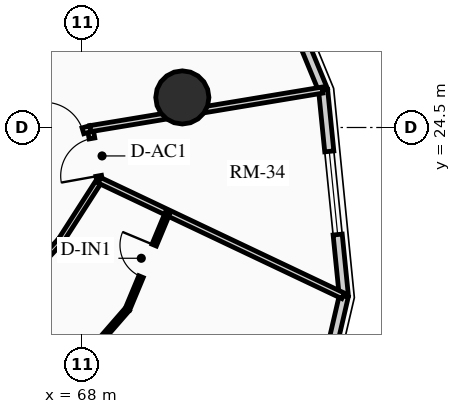
"""IFC4 building model, lengths in metres.
Left out: names, types, materials, properties, quantities, classifications, styles, units other than length and angle.
Written with IfcOpenShell. Run it as: python <this file> out.ifc"""

import sys

from ifc_helpers import new_model, si_unit, direction, frame, frame_2d, origin, origin_2d, place, context, subcontext, project, spatial, rectangle, circle, extrude, source, transform, mapped, element, fill, save


model = new_model("IFC4")
c1 = context("Model", 3, precision=1e-05, world=origin(), true_north=direction((0.0, 1.0)))
c2 = subcontext(c1, "Body", "Model", "MODEL_VIEW")
j1 = project(units=[si_unit("LENGTHUNIT", "METRE"), si_unit("PLANEANGLEUNIT", "RADIAN")], contexts=[c1])
p1 = place(None, origin())
s1 = spatial("IfcSite", under=j1, at=p1, CompositionType="ELEMENT")
p2 = place(p1, origin())
s2 = spatial("IfcBuilding", under=s1, at=p2, CompositionType="ELEMENT")
p3 = place(p2, frame((0.0, 0.0, 107.98)))
s3 = spatial("IfcBuildingStorey", under=s2, at=p3, CompositionType="ELEMENT", Elevation=107.98)
p4 = place(p3, frame((70.635, 25.291, 0.0), z_axis=(0.0, 0.0, 1.0), x_axis=(1.0, 0.0, 0.0)))
e1 = element("IfcColumn", 1, at=p4, inside=s3, PredefinedType="USERDEFINED", context=c2, shape_type="SweptSolid", body=[
    extrude(circle(Radius=0.7, at=origin_2d()), origin(), (0.0, 0.0, 1.0), 2.91),
])
p5 = place(p3, frame((74.885, 20.067, 0.0), z_axis=(0.0, 0.0, 1.0), x_axis=(-0.225834725257, -0.974165631126, 0.0)))
e2 = element("IfcWall", 2, at=p5, inside=s3, PredefinedType="SOLIDWALL", context=c2, shape_type="SweptSolid", body=[
    extrude(rectangle(XDim=5.119, YDim=0.24, at=frame_2d((2.56, 0.0))), origin(), (0.0, 0.0, 1.0), 2.179),
])
p6 = place(p3, frame((74.339, 25.487, 0.0), z_axis=(0.0, 0.0, 1.0), x_axis=(0.10015591906, -0.994971754311, 0.0)))
e3 = element("IfcWall", 3, at=p6, inside=s3, PredefinedType="SOLIDWALL", context=c2, shape_type="SweptSolid", body=[
    extrude(rectangle(XDim=5.448, YDim=0.24, at=frame_2d((2.724, 0.0))), origin(), (0.0, 0.0, 1.0), 2.179),
])
m1 = source(origin(), c2, "Body", "SweptSolid", [
    extrude(rectangle(XDim=2.2, YDim=1.35, at=frame_2d((1.1, 0.675))), frame((0.0, 0.13, 0.0), z_axis=(0.0, -1.0, 0.0), x_axis=(1.0, 0.0, 0.0)), (0.0, 0.0, 1.0), 0.26),
])
p7 = place(p6, frame((1.624, 0.0, 0.65)))
e4 = element("IfcOpeningElement", 4, at=p7, cuts=e3, PredefinedType="OPENING", context=c2, shape_type="MappedRepresentation", body=[
    mapped(m1, transform((0.0, 0.0, 0.0), x_axis=(1.0, 0.0, 0.0), y_axis=(0.0, 1.0, 0.0), z_axis=(0.0, 0.0, 1.0), scale=1.0)),
])
p8 = place(p3, frame((72.145, 30.811, 0.0), z_axis=(0.0, 0.0, 1.0), x_axis=(0.381027003055, -0.924563909604, 0.0)))
e5 = element("IfcWall", 5, at=p8, inside=s3, PredefinedType="SOLIDWALL", context=c2, shape_type="SweptSolid", body=[
    extrude(rectangle(XDim=5.758, YDim=0.24, at=frame_2d((2.879, 0.0))), origin(), (0.0, 0.0, 1.0), 2.179),
])
p9 = place(p3, frame((62.903, 16.667, 0.0), z_axis=(0.0, 0.0, 1.0), x_axis=(0.682371947497, 0.731005147225, 0.0)))
e6 = element("IfcWall", 6, at=p9, inside=s3, PredefinedType="PARTITIONING", context=c2, shape_type="SweptSolid", body=[
    extrude(rectangle(XDim=6.642, YDim=0.15, at=frame_2d((3.321, 0.0))), origin(), (0.0, 0.0, 1.0), 2.225),
])
m2 = source(origin(), c2, "Body", "SweptSolid", [
    extrude(rectangle(XDim=1.05, YDim=2.015, at=frame_2d((0.525, 1.007))), frame((0.0, 0.085, 0.0), z_axis=(0.0, -1.0, 0.0), x_axis=(1.0, 0.0, 0.0)), (0.0, 0.0, 1.0), 0.17),
])
p10 = place(p9, frame((2.796, 0.0, 0.0)))
e7 = element("IfcOpeningElement", 7, at=p10, cuts=e6, PredefinedType="OPENING", context=c2, shape_type="MappedRepresentation", body=[
    mapped(m2, transform((0.0, 0.0, 0.0), x_axis=(1.0, 0.0, 0.0), y_axis=(0.0, 1.0, 0.0), z_axis=(0.0, 0.0, 1.0), scale=1.0)),
])
p11 = place(p3, frame((67.435, 21.521, 0.0), z_axis=(0.0, 0.0, 1.0), x_axis=(0.540777197838, 0.841165870859, 0.0)))
e8 = element("IfcWall", 8, at=p11, inside=s3, PredefinedType="PARTITIONING", context=c2, shape_type="SweptSolid", body=[
    extrude(rectangle(XDim=1.888, YDim=0.15, at=frame_2d((0.944, 0.0))), origin(), (0.0, 0.0, 1.0), 2.225),
])
p12 = place(p3, frame((68.456, 23.11, 0.0), z_axis=(0.0, 0.0, 1.0), x_axis=(-0.1772522795, 0.984165448191, 0.0)))
e9 = element("IfcWall", 9, at=p12, inside=s3, PredefinedType="PARTITIONING", context=c2, shape_type="SweptSolid", body=[
    extrude(rectangle(XDim=1.382, YDim=0.15, at=frame_2d((0.691, 0.0))), origin(), (0.0, 0.0, 1.0), 2.225),
])
m3 = source(origin(), c2, "Body", "SweptSolid", [
    extrude(rectangle(XDim=1.0, YDim=2.015, at=frame_2d((0.5, 1.007))), frame((0.0, 0.085, 0.0), z_axis=(0.0, -1.0, 0.0), x_axis=(1.0, 0.0, 0.0)), (0.0, 0.0, 1.0), 0.17),
])
p13 = place(p12, frame((0.12, 0.0, 0.0)))
e10 = element("IfcOpeningElement", 10, at=p13, cuts=e9, PredefinedType="OPENING", context=c2, shape_type="MappedRepresentation", body=[
    mapped(m3, transform((0.0, 0.0, 0.0), x_axis=(1.0, 0.0, 0.0), y_axis=(0.0, 1.0, 0.0), z_axis=(0.0, 0.0, 1.0), scale=1.0)),
])
p14 = place(p3, frame((68.456, 23.11, 0.0), z_axis=(0.0, 0.0, 1.0), x_axis=(0.903539425667, -0.428504966442, 0.0)))
e11 = element("IfcWall", 11, at=p14, inside=s3, PredefinedType="PARTITIONING", context=c2, shape_type="SweptSolid", body=[
    extrude(rectangle(XDim=7.094, YDim=0.16, at=frame_2d((3.547, 0.0))), origin(), (0.0, 0.0, 1.0), 2.179),
])
p15 = place(p3, frame((68.211, 24.469, 0.0), z_axis=(0.0, 0.0, 1.0), x_axis=(0.986479033329, 0.163887512651, 0.0)))
e12 = element("IfcWall", 12, at=p15, inside=s3, PredefinedType="PARTITIONING", context=c2, shape_type="SweptSolid", body=[
    extrude(rectangle(XDim=6.193, YDim=0.16, at=frame_2d((3.096, 0.0))), origin(), (0.0, 0.0, 1.0), 2.179),
])
p16 = place(p3, frame((66.056, 23.828, 0.0), z_axis=(0.0, 0.0, 1.0), x_axis=(0.958475403544, 0.285175210708, 0.0)))
e13 = element("IfcWall", 13, at=p16, inside=s3, PredefinedType="PARTITIONING", context=c2, shape_type="SweptSolid", body=[
    extrude(rectangle(XDim=2.248, YDim=0.16, at=frame_2d((1.124, 0.0))), origin(), (0.0, 0.0, 1.0), 2.225),
])
m4 = source(origin(), c2, "Body", "SweptSolid", [
    extrude(rectangle(XDim=1.05, YDim=2.015, at=frame_2d((0.525, 1.007))), frame((0.0, 0.09, 0.0), z_axis=(0.0, -1.0, 0.0), x_axis=(1.0, 0.0, 0.0)), (0.0, 0.0, 1.0), 0.18),
])
p17 = place(p16, frame((0.998, 0.0, 0.0)))
e14 = element("IfcOpeningElement", 14, at=p17, cuts=e13, PredefinedType="OPENING", context=c2, shape_type="MappedRepresentation", body=[
    mapped(m4, transform((0.0, 0.0, 0.0), x_axis=(1.0, 0.0, 0.0), y_axis=(0.0, 1.0, 0.0), z_axis=(0.0, 0.0, 1.0), scale=1.0)),
])
p18 = place(p3, frame((65.162, 15.088, 0.0), z_axis=(0.0, 0.0, 1.0), x_axis=(0.656379509785, 0.754430871011, 0.0)))
e15 = element("IfcWall", 15, at=p18, inside=s3, PredefinedType="PARTITIONING", context=c2, shape_type="SweptSolid", body=[
    extrude(rectangle(XDim=6.14, YDim=0.125, at=frame_2d((3.07, 0.0))), origin(), (0.0, 0.0, 1.0), 2.225),
])
p19 = place(p3, frame((69.192, 19.72, 0.0), z_axis=(0.0, 0.0, 1.0), x_axis=(0.384899070029, 0.922958669655, 0.0)))
e16 = element("IfcWall", 16, at=p19, inside=s3, PredefinedType="PARTITIONING", context=c2, shape_type="SweptSolid", body=[
    extrude(rectangle(XDim=2.75, YDim=0.125, at=frame_2d((1.375, 0.0))), origin(), (0.0, 0.0, 1.0), 2.179),
])
m5 = source(origin(), c2, "Body", "SweptSolid", [
    extrude(rectangle(XDim=0.9, YDim=2.005, at=frame_2d((0.45, 1.002))), frame((0.0, 0.073, 0.0), z_axis=(0.0, -1.0, 0.0), x_axis=(1.0, 0.0, 0.0)), (0.0, 0.0, 1.0), 0.145),
])
p20 = place(p19, frame((0.925, 0.0, 0.0)))
e17 = element("IfcOpeningElement", 17, at=p20, cuts=e16, PredefinedType="OPENING", context=c2, shape_type="MappedRepresentation", body=[
    mapped(m5, transform((0.0, 0.0, 0.0), x_axis=(1.0, 0.0, 0.0), y_axis=(0.0, 1.0, 0.0), z_axis=(0.0, 0.0, 1.0), scale=1.0)),
])
m6 = source(origin(), c2, "Body", "SweptSolid", [
    extrude(rectangle(XDim=2.2, YDim=1.35, at=frame_2d((1.1, 0.675))), frame((0.0, 0.03, 0.0), z_axis=(0.0, -1.0, 0.0), x_axis=(1.0, 0.0, 0.0)), (0.0, 0.0, 1.0), 0.06),
])
p21 = place(p7, origin())
e18 = element("IfcWindow", 18, at=p21, inside=s3, PartitioningType="DOUBLE_PANEL_VERTICAL", PredefinedType="WINDOW", context=c2, shape_type="MappedRepresentation", body=[
    mapped(m6, transform((0.0, 0.0, 0.0), x_axis=(1.0, 0.0, 0.0), y_axis=(0.0, 1.0, 0.0), z_axis=(0.0, 0.0, 1.0), scale=1.0)),
])
fill(e4, e18)
m7 = source(origin(), c2, "Body", "SweptSolid", [
    extrude(rectangle(XDim=1.05, YDim=2.015, at=frame_2d((0.525, 1.007))), frame((0.0, 0.025, 0.0), z_axis=(0.0, -1.0, 0.0), x_axis=(1.0, 0.0, 0.0)), (0.0, 0.0, 1.0), 0.05),
])
p22 = place(p17, origin())
e19 = element("IfcDoor", 19, at=p22, inside=s3, OperationType="SINGLE_SWING_LEFT", PredefinedType="DOOR", context=c2, shape_type="MappedRepresentation", body=[
    mapped(m7, transform((0.0, 0.0, 0.0), x_axis=(1.0, 0.0, 0.0), y_axis=(0.0, 1.0, 0.0), z_axis=(0.0, 0.0, 1.0), scale=1.0)),
])
fill(e14, e19)
m8 = source(origin(), c2, "Body", "SweptSolid", [
    extrude(rectangle(XDim=0.9, YDim=2.005, at=frame_2d((0.45, 1.002))), frame((0.0, 0.025, 0.0), z_axis=(0.0, -1.0, 0.0), x_axis=(1.0, 0.0, 0.0)), (0.0, 0.0, 1.0), 0.05),
])
p23 = place(p20, origin())
e20 = element("IfcDoor", 20, at=p23, inside=s3, OperationType="SINGLE_SWING_RIGHT", PredefinedType="DOOR", context=c2, shape_type="MappedRepresentation", body=[
    mapped(m8, transform((0.0, 0.0, 0.0), x_axis=(1.0, 0.0, 0.0), y_axis=(0.0, 1.0, 0.0), z_axis=(0.0, 0.0, 1.0), scale=1.0)),
])
fill(e17, e20)
m9 = source(origin(), c2, "Body", "SweptSolid", [
    extrude(rectangle(XDim=1.0, YDim=2.015, at=frame_2d((0.5, 1.007))), frame((0.0, 0.025, 0.0), z_axis=(0.0, -1.0, 0.0), x_axis=(1.0, 0.0, 0.0)), (0.0, 0.0, 1.0), 0.05),
])
p24 = place(p13, origin())
e21 = element("IfcDoor", 21, at=p24, inside=s3, OperationType="SINGLE_SWING_LEFT", PredefinedType="DOOR", context=c2, shape_type="MappedRepresentation", body=[
    mapped(m9, transform((0.0, 0.0, 0.0), x_axis=(1.0, 0.0, 0.0), y_axis=(0.0, 1.0, 0.0), z_axis=(0.0, 0.0, 1.0), scale=1.0)),
])
fill(e10, e21)
save(model, sys.argv[1])
